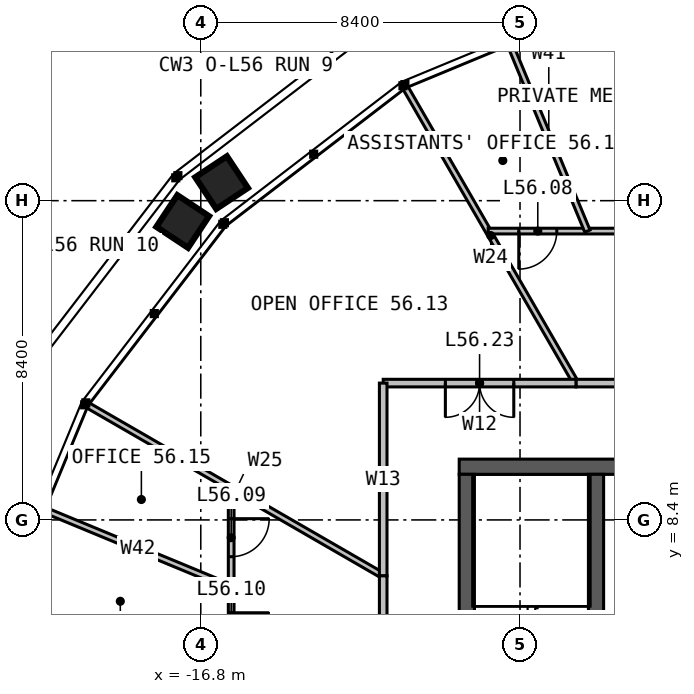
"""IFC4 building model, lengths in metres.
Left out: names, types, materials, properties, quantities, classifications, styles, units other than length and angle.
Written with IfcOpenShell. Run it as: python <this file> out.ifc"""

import sys

from ifc_helpers import new_model, si_unit, direction, frame, frame_2d, origin, place, context, subcontext, project, spatial, rectangle, extrude, element, fill, save


model = new_model("IFC4")
c1 = context("Model", 3, precision=1e-05, world=origin(), true_north=direction((0.0, 1.0)))
c2 = subcontext(c1, "Body", "Model", "MODEL_VIEW")
j1 = project(units=[si_unit("LENGTHUNIT", "METRE"), si_unit("PLANEANGLEUNIT", "RADIAN")], contexts=[c1])
p1 = place(None, origin())
s1 = spatial("IfcSite", under=j1, at=p1, CompositionType="ELEMENT")
p2 = place(p1, origin())
s2 = spatial("IfcBuilding", under=s1, at=p2, CompositionType="ELEMENT")
p3 = place(p2, frame((0.0, 0.0, 232.0)))
s3 = spatial("IfcBuildingStorey", under=s2, at=p3, CompositionType="ELEMENT", Elevation=232.0)
p4 = place(p3, frame((-10.0, 9.8, 0.0), z_axis=(0.0, 0.0, 1.0), x_axis=(1.0, 0.0, 0.0)))
e1 = element("IfcWall", 1, at=p4, inside=s3, PredefinedType="SOLIDWALL", context=c2, shape_type="SweptSolid", body=[
    extrude(rectangle(XDim=20.0, YDim=0.4, at=frame_2d((10.0, 0.0))), origin(), (0.0, 0.0, 1.0), 4.0),
])
p5 = place(p4, frame((9.4, 0.0, 0.0)))
e2 = element("IfcOpeningElement", 2, at=p5, cuts=e1, PredefinedType="OPENING", context=c2, shape_type="SweptSolid", body=[
    extrude(rectangle(XDim=1.2, YDim=2.2, at=frame_2d((0.6, 1.1))), frame((0.0, 0.21, 0.0), z_axis=(0.0, -1.0, 0.0), x_axis=(1.0, 0.0, 0.0)), (0.0, 0.0, 1.0), 0.42),
])
p6 = place(p3, frame((-9.8, 9.6, 0.0), z_axis=(0.0, 0.0, 1.0), x_axis=(0.0, -1.0, 0.0)))
e3 = element("IfcWall", 3, at=p6, inside=s3, PredefinedType="SOLIDWALL", context=c2, shape_type="SweptSolid", body=[
    extrude(rectangle(XDim=19.2, YDim=0.4, at=frame_2d((9.6, 0.0))), origin(), (0.0, 0.0, 1.0), 4.0),
])
p7 = place(p3, frame((-6.4, -9.6, 0.0), z_axis=(0.0, 0.0, 1.0), x_axis=(0.0, 1.0, 0.0)))
e4 = element("IfcWall", 4, at=p7, inside=s3, PredefinedType="SOLIDWALL", context=c2, shape_type="SweptSolid", body=[
    extrude(rectangle(XDim=19.2, YDim=0.4, at=frame_2d((9.6, 0.0))), origin(), (0.0, 0.0, 1.0), 4.0),
])
p8 = place(p7, frame((9.1, 0.0, 0.0)))
e5 = element("IfcOpeningElement", 5, at=p8, cuts=e4, PredefinedType="OPENING", context=c2, shape_type="SweptSolid", body=[
    extrude(rectangle(XDim=1.0, YDim=2.2, at=frame_2d((0.5, 1.1))), frame((0.0, 0.21, 0.0), z_axis=(0.0, -1.0, 0.0), x_axis=(1.0, 0.0, 0.0)), (0.0, 0.0, 1.0), 0.42),
])
for number, where, z_axis, x_axis in (
    (6, (-6.928, 12.0, 0.0), (0.0, 0.0, 1.0), (-0.5, 0.866, 0.0)),
    (7, (-12.0, 6.928, 0.0), (0.0, 0.0, 1.0), (-0.866, 0.5, 0.0)),
):
    element("IfcWall", number, at=place(p3, frame(where, z_axis=z_axis, x_axis=x_axis)), inside=s3, PredefinedType="PARTITIONING", context=c2, shape_type="SweptSolid", body=[
        extrude(rectangle(XDim=8.966, YDim=0.15, at=frame_2d((4.483, 0.0))), origin(), (0.0, 0.0, 1.0), 2.79),
    ])
p9 = place(p3, frame((9.238, 16.0, 0.0), z_axis=(0.0, 0.0, 1.0), x_axis=(-1.0, 0.0, 0.0)))
e8 = element("IfcWall", 8, at=p9, inside=s3, PredefinedType="PARTITIONING", context=c2, shape_type="SweptSolid", body=[
    extrude(rectangle(XDim=18.475, YDim=0.15, at=frame_2d((9.238, 0.0))), origin(), (0.0, 0.0, 1.0), 2.79),
])
p10 = place(p9, frame((1.975, 0.0, 0.0)))
e9 = element("IfcOpeningElement", 9, at=p10, cuts=e8, PredefinedType="OPENING", context=c2, shape_type="SweptSolid", body=[
    extrude(rectangle(XDim=1.0, YDim=2.2, at=frame_2d((0.5, 1.1))), frame((0.0, 0.085, 0.0), z_axis=(0.0, -1.0, 0.0), x_axis=(1.0, 0.0, 0.0)), (0.0, 0.0, 1.0), 0.17),
])
p11 = place(p9, frame((5.541, 0.0, 0.0)))
e10 = element("IfcOpeningElement", 10, at=p11, cuts=e8, PredefinedType="OPENING", context=c2, shape_type="SweptSolid", body=[
    extrude(rectangle(XDim=1.0, YDim=2.2, at=frame_2d((0.5, 1.1))), frame((0.0, 0.085, 0.0), z_axis=(0.0, -1.0, 0.0), x_axis=(1.0, 0.0, 0.0)), (0.0, 0.0, 1.0), 0.17),
])
p12 = place(p9, frame((7.684, 0.0, 0.0)))
e11 = element("IfcOpeningElement", 11, at=p12, cuts=e8, PredefinedType="OPENING", context=c2, shape_type="SweptSolid", body=[
    extrude(rectangle(XDim=1.0, YDim=2.2, at=frame_2d((0.5, 1.1))), frame((0.0, 0.085, 0.0), z_axis=(0.0, -1.0, 0.0), x_axis=(1.0, 0.0, 0.0)), (0.0, 0.0, 1.0), 0.17),
])
p13 = place(p9, frame((9.791, 0.0, 0.0)))
e12 = element("IfcOpeningElement", 12, at=p13, cuts=e8, PredefinedType="OPENING", context=c2, shape_type="SweptSolid", body=[
    extrude(rectangle(XDim=1.0, YDim=2.2, at=frame_2d((0.5, 1.1))), frame((0.0, 0.085, 0.0), z_axis=(0.0, -1.0, 0.0), x_axis=(1.0, 0.0, 0.0)), (0.0, 0.0, 1.0), 0.17),
])
p14 = place(p9, frame((13.104, 0.0, 0.0)))
e13 = element("IfcOpeningElement", 13, at=p14, cuts=e8, PredefinedType="OPENING", context=c2, shape_type="SweptSolid", body=[
    extrude(rectangle(XDim=1.0, YDim=2.2, at=frame_2d((0.5, 1.1))), frame((0.0, 0.085, 0.0), z_axis=(0.0, -1.0, 0.0), x_axis=(1.0, 0.0, 0.0)), (0.0, 0.0, 1.0), 0.17),
])
p15 = place(p9, frame((16.67, 0.0, 0.0)))
e14 = element("IfcOpeningElement", 14, at=p15, cuts=e8, PredefinedType="OPENING", context=c2, shape_type="SweptSolid", body=[
    extrude(rectangle(XDim=1.0, YDim=2.2, at=frame_2d((0.5, 1.1))), frame((0.0, 0.085, 0.0), z_axis=(0.0, -1.0, 0.0), x_axis=(1.0, 0.0, 0.0)), (0.0, 0.0, 1.0), 0.17),
])
p16 = place(p3, frame((-6.627, 16.0, 0.0), z_axis=(0.0, 0.0, 1.0), x_axis=(-0.382678083764, 0.923881747956, 0.0)))
e15 = element("IfcWall", 15, at=p16, inside=s3, PredefinedType="PARTITIONING", context=c2, shape_type="SweptSolid", body=[
    extrude(rectangle(XDim=5.309, YDim=0.15, at=frame_2d((2.654, 0.0))), origin(), (0.0, 0.0, 1.0), 2.79),
])
p17 = place(p3, frame((6.928, 12.0, 0.0), z_axis=(0.0, 0.0, 1.0), x_axis=(-1.0, 0.0, 0.0)))
e16 = element("IfcWall", 16, at=p17, inside=s3, PredefinedType="PARTITIONING", context=c2, shape_type="SweptSolid", body=[
    extrude(rectangle(XDim=13.856, YDim=0.2, at=frame_2d((6.928, 0.0))), origin(), (0.0, 0.0, 1.0), 3.8),
])
p18 = place(p17, frame((6.028, 0.0, 0.0)))
e17 = element("IfcOpeningElement", 17, at=p18, cuts=e16, PredefinedType="OPENING", context=c2, shape_type="SweptSolid", body=[
    extrude(rectangle(XDim=1.8, YDim=2.2, at=frame_2d((0.9, 1.1))), frame((0.0, 0.11, 0.0), z_axis=(0.0, -1.0, 0.0), x_axis=(1.0, 0.0, 0.0)), (0.0, 0.0, 1.0), 0.22),
])
p19 = place(p3, frame((-6.928, 12.0, 0.0), z_axis=(0.0, 0.0, 1.0), x_axis=(-1.0, 0.0, 0.0)))
e18 = element("IfcWall", 18, at=p19, inside=s3, PredefinedType="PARTITIONING", context=c2, shape_type="SweptSolid", body=[
    extrude(rectangle(XDim=5.072, YDim=0.2, at=frame_2d((2.536, 0.0))), origin(), (0.0, 0.0, 1.0), 3.8),
])
p20 = place(p19, frame((1.636, 0.0, 0.0)))
e19 = element("IfcOpeningElement", 19, at=p20, cuts=e18, PredefinedType="OPENING", context=c2, shape_type="SweptSolid", body=[
    extrude(rectangle(XDim=1.8, YDim=2.2, at=frame_2d((0.9, 1.1))), frame((0.0, 0.11, 0.0), z_axis=(0.0, -1.0, 0.0), x_axis=(1.0, 0.0, 0.0)), (0.0, 0.0, 1.0), 0.22),
])
p21 = place(p3, frame((-12.0, 12.0, 0.0), z_axis=(0.0, 0.0, 1.0), x_axis=(0.0, -1.0, 0.0)))
e20 = element("IfcWall", 20, at=p21, inside=s3, PredefinedType="PARTITIONING", context=c2, shape_type="SweptSolid", body=[
    extrude(rectangle(XDim=5.072, YDim=0.2, at=frame_2d((2.536, 0.0))), origin(), (0.0, 0.0, 1.0), 3.8),
])
p22 = place(p3, frame((-16.0, 9.238, 0.0), z_axis=(0.0, 0.0, 1.0), x_axis=(0.0, -1.0, 0.0)))
e21 = element("IfcWall", 21, at=p22, inside=s3, PredefinedType="PARTITIONING", context=c2, shape_type="SweptSolid", body=[
    extrude(rectangle(XDim=18.475, YDim=0.15, at=frame_2d((9.238, 0.0))), origin(), (0.0, 0.0, 1.0), 2.79),
])
p23 = place(p22, frame((0.805, 0.0, 0.0)))
e22 = element("IfcOpeningElement", 22, at=p23, cuts=e21, PredefinedType="OPENING", context=c2, shape_type="SweptSolid", body=[
    extrude(rectangle(XDim=1.0, YDim=2.2, at=frame_2d((0.5, 1.1))), frame((0.0, 0.085, 0.0), z_axis=(0.0, -1.0, 0.0), x_axis=(1.0, 0.0, 0.0)), (0.0, 0.0, 1.0), 0.17),
])
p24 = place(p22, frame((3.28, 0.0, 0.0)))
e23 = element("IfcOpeningElement", 23, at=p24, cuts=e21, PredefinedType="OPENING", context=c2, shape_type="SweptSolid", body=[
    extrude(rectangle(XDim=1.0, YDim=2.2, at=frame_2d((0.5, 1.1))), frame((0.0, 0.085, 0.0), z_axis=(0.0, -1.0, 0.0), x_axis=(1.0, 0.0, 0.0)), (0.0, 0.0, 1.0), 0.17),
])
p25 = place(p22, frame((6.594, 0.0, 0.0)))
e24 = element("IfcOpeningElement", 24, at=p25, cuts=e21, PredefinedType="OPENING", context=c2, shape_type="SweptSolid", body=[
    extrude(rectangle(XDim=1.0, YDim=2.2, at=frame_2d((0.5, 1.1))), frame((0.0, 0.085, 0.0), z_axis=(0.0, -1.0, 0.0), x_axis=(1.0, 0.0, 0.0)), (0.0, 0.0, 1.0), 0.17),
])
p26 = place(p22, frame((12.956, 0.0, 0.0)))
e25 = element("IfcOpeningElement", 25, at=p26, cuts=e21, PredefinedType="OPENING", context=c2, shape_type="SweptSolid", body=[
    extrude(rectangle(XDim=1.8, YDim=2.2, at=frame_2d((0.9, 1.1))), frame((0.0, 0.085, 0.0), z_axis=(0.0, -1.0, 0.0), x_axis=(1.0, 0.0, 0.0)), (0.0, 0.0, 1.0), 0.17),
])
p27 = place(p3, frame((-16.0, 6.627, 0.0), z_axis=(0.0, 0.0, 1.0), x_axis=(-0.923881747956, 0.382678083764, 0.0)))
e26 = element("IfcWall", 26, at=p27, inside=s3, PredefinedType="PARTITIONING", context=c2, shape_type="SweptSolid", body=[
    extrude(rectangle(XDim=5.309, YDim=0.15, at=frame_2d((2.654, 0.0))), origin(), (0.0, 0.0, 1.0), 2.79),
])
p28 = place(p3, frame((-16.0, 4.287, 0.0), z_axis=(0.0, 0.0, 1.0), x_axis=(-0.965927328821, 0.258813437513, 0.0)))
e27 = element("IfcWall", 27, at=p28, inside=s3, PredefinedType="PARTITIONING", context=c2, shape_type="SweptSolid", body=[
    extrude(rectangle(XDim=6.258, YDim=0.15, at=frame_2d((3.129, 0.0))), origin(), (0.0, 0.0, 1.0), 2.79),
])
p29 = place(p3, frame((-12.0, 6.928, 0.0), z_axis=(0.0, 0.0, 1.0), x_axis=(0.0, -1.0, 0.0)))
e28 = element("IfcWall", 28, at=p29, inside=s3, PredefinedType="PARTITIONING", context=c2, shape_type="SweptSolid", body=[
    extrude(rectangle(XDim=13.856, YDim=0.2, at=frame_2d((6.928, 0.0))), origin(), (0.0, 0.0, 1.0), 3.8),
])
p30 = place(p29, frame((6.028, 0.0, 0.0)))
e29 = element("IfcOpeningElement", 29, at=p30, cuts=e28, PredefinedType="OPENING", context=c2, shape_type="SweptSolid", body=[
    extrude(rectangle(XDim=1.8, YDim=2.2, at=frame_2d((0.9, 1.1))), frame((0.0, 0.11, 0.0), z_axis=(0.0, -1.0, 0.0), x_axis=(1.0, 0.0, 0.0)), (0.0, 0.0, 1.0), 0.22),
])
p31 = place(p15, origin())
e30 = element("IfcDoor", 30, at=p31, inside=s3, OperationType="SINGLE_SWING_RIGHT", PredefinedType="DOOR", context=c2, shape_type="SweptSolid", body=[
    extrude(rectangle(XDim=1.0, YDim=2.2, at=frame_2d((0.5, 1.1))), frame((0.0, 0.025, 0.0), z_axis=(0.0, -1.0, 0.0), x_axis=(1.0, 0.0, 0.0)), (0.0, 0.0, 1.0), 0.05),
])
fill(e14, e30)
p32 = place(p20, origin())
e31 = element("IfcDoor", 31, at=p32, inside=s3, OperationType="DOUBLE_DOOR_SINGLE_SWING", PredefinedType="DOOR", context=c2, shape_type="SweptSolid", body=[
    extrude(rectangle(XDim=1.8, YDim=2.2, at=frame_2d((0.9, 1.1))), frame((0.0, 0.025, 0.0), z_axis=(0.0, -1.0, 0.0), x_axis=(1.0, 0.0, 0.0)), (0.0, 0.0, 1.0), 0.05),
])
fill(e19, e31)
p33 = place(p23, origin())
e32 = element("IfcDoor", 32, at=p33, inside=s3, OperationType="SINGLE_SWING_LEFT", PredefinedType="DOOR", context=c2, shape_type="SweptSolid", body=[
    extrude(rectangle(XDim=1.0, YDim=2.2, at=frame_2d((0.5, 1.1))), frame((0.0, 0.025, 0.0), z_axis=(0.0, -1.0, 0.0), x_axis=(1.0, 0.0, 0.0)), (0.0, 0.0, 1.0), 0.05),
])
fill(e22, e32)
p34 = place(p24, origin())
e33 = element("IfcDoor", 33, at=p34, inside=s3, OperationType="SINGLE_SWING_LEFT", PredefinedType="DOOR", context=c2, shape_type="SweptSolid", body=[
    extrude(rectangle(XDim=1.0, YDim=2.2, at=frame_2d((0.5, 1.1))), frame((0.0, 0.025, 0.0), z_axis=(0.0, -1.0, 0.0), x_axis=(1.0, 0.0, 0.0)), (0.0, 0.0, 1.0), 0.05),
])
fill(e23, e33)
save(model, sys.argv[1])
